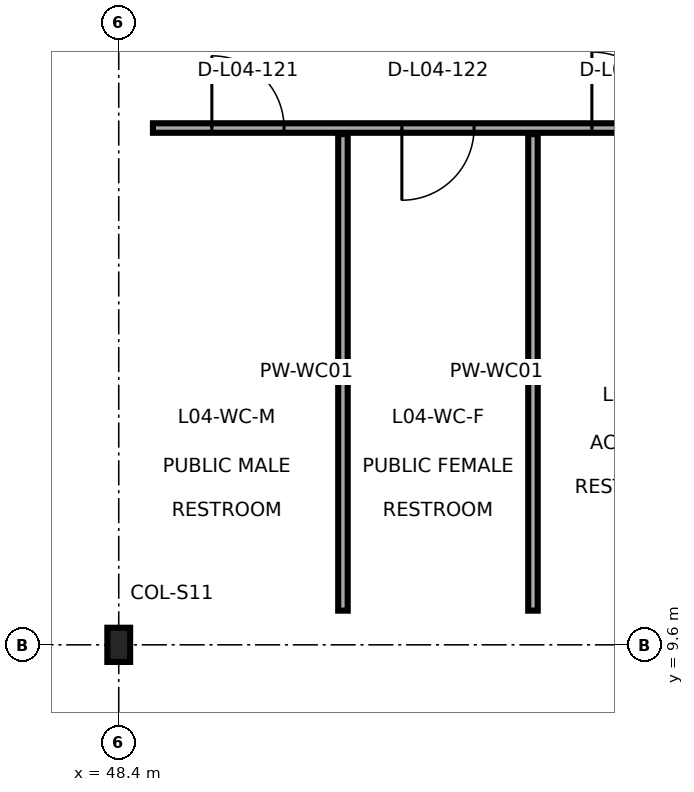
"""IFC4 building model, lengths in metres.
Left out: names, types, materials, properties, quantities, classifications, styles, units other than length and angle.
Written with IfcOpenShell. Run it as: python <this file> out.ifc"""

import sys

from ifc_helpers import new_model, si_unit, direction, frame, frame_2d, origin, origin_2d, place, context, subcontext, project, spatial, rectangle, i_section, extrude, element, fill, save


model = new_model("IFC4")
c1 = context("Model", 3, precision=1e-05, world=origin(), true_north=direction((0.0, 1.0)))
c2 = subcontext(c1, "Body", "Model", "MODEL_VIEW")
j1 = project(units=[si_unit("LENGTHUNIT", "METRE"), si_unit("PLANEANGLEUNIT", "RADIAN")], contexts=[c1])
p1 = place(None, origin())
s1 = spatial("IfcSite", under=j1, at=p1, CompositionType="ELEMENT")
p2 = place(p1, origin())
s2 = spatial("IfcBuilding", under=s1, at=p2, CompositionType="ELEMENT")
p3 = place(p2, frame((0.0, 0.0, 21.9)))
s3 = spatial("IfcBuildingStorey", under=s2, at=p3, CompositionType="ELEMENT", Elevation=21.9)
p4 = place(p3, frame((48.4, 9.6, 0.0), z_axis=(0.0, 0.0, 1.0), x_axis=(1.0, 0.0, 0.0)))
e1 = element("IfcColumn", 1, at=p4, inside=s3, PredefinedType="COLUMN", context=c2, shape_type="SweptSolid", body=[
    extrude(i_section(OverallWidth=0.3, OverallDepth=0.45, WebThickness=0.014, FlangeThickness=0.026, FilletRadius=0.027, at=origin_2d()), origin(), (0.0, 0.0, 1.0), 4.5),
])
p5 = place(p3, frame((48.85, 16.4, 0.0), z_axis=(0.0, 0.0, 1.0), x_axis=(1.0, 0.0, 0.0)))
e2 = element("IfcWall", 2, at=p5, inside=s3, PredefinedType="PARTITIONING", context=c2, shape_type="SweptSolid", body=[
    extrude(rectangle(XDim=7.5, YDim=0.125, at=frame_2d((3.75, 0.0))), origin(), (0.0, 0.0, 1.0), 3.902),
])
p6 = place(p5, frame((0.775, 0.0, 0.0)))
e3 = element("IfcOpeningElement", 3, at=p6, cuts=e2, PredefinedType="OPENING", context=c2, shape_type="SweptSolid", body=[
    extrude(rectangle(XDim=0.95, YDim=2.1, at=frame_2d((0.475, 1.05))), frame((0.0, 0.073, 0.0), z_axis=(0.0, -1.0, 0.0), x_axis=(1.0, 0.0, 0.0)), (0.0, 0.0, 1.0), 0.145),
])
p7 = place(p5, frame((3.275, 0.0, 0.0)))
e4 = element("IfcOpeningElement", 4, at=p7, cuts=e2, PredefinedType="OPENING", context=c2, shape_type="SweptSolid", body=[
    extrude(rectangle(XDim=0.95, YDim=2.1, at=frame_2d((0.475, 1.05))), frame((0.0, 0.073, 0.0), z_axis=(0.0, -1.0, 0.0), x_axis=(1.0, 0.0, 0.0)), (0.0, 0.0, 1.0), 0.145),
])
p8 = place(p5, frame((5.775, 0.0, 0.0)))
e5 = element("IfcOpeningElement", 5, at=p8, cuts=e2, PredefinedType="OPENING", context=c2, shape_type="SweptSolid", body=[
    extrude(rectangle(XDim=1.0, YDim=2.12, at=frame_2d((0.5, 1.06))), frame((0.0, 0.073, 0.0), z_axis=(0.0, -1.0, 0.0), x_axis=(1.0, 0.0, 0.0)), (0.0, 0.0, 1.0), 0.145),
])
for number, where, z_axis, x_axis in (
    (6, (51.35, 10.05, 0.0), (0.0, 0.0, 1.0), (0.0, 1.0, 0.0)),
    (7, (53.85, 10.05, 0.0), (0.0, 0.0, 1.0), (0.0, 1.0, 0.0)),
):
    element("IfcWall", number, at=place(p3, frame(where, z_axis=z_axis, x_axis=x_axis)), inside=s3, PredefinedType="PARTITIONING", context=c2, shape_type="SweptSolid", body=[
        extrude(rectangle(XDim=6.27, YDim=0.125, at=frame_2d((3.135, 0.0))), origin(), (0.0, 0.0, 1.0), 4.23),
    ])
p9 = place(p6, frame((0.95, 0.0, 0.0), z_axis=(0.0, 0.0, 1.0), x_axis=(-1.0, 0.0, 0.0)))
e8 = element("IfcDoor", 8, at=p9, inside=s3, OperationType="SINGLE_SWING_LEFT", PredefinedType="DOOR", context=c2, shape_type="SweptSolid", body=[
    extrude(rectangle(XDim=0.95, YDim=2.1, at=frame_2d((0.475, 1.05))), frame((0.0, 0.025, 0.0), z_axis=(0.0, -1.0, 0.0), x_axis=(1.0, 0.0, 0.0)), (0.0, 0.0, 1.0), 0.05),
])
fill(e3, e8)
p10 = place(p7, frame((0.95, 0.0, 0.0), z_axis=(0.0, 0.0, 1.0), x_axis=(-1.0, 0.0, 0.0)))
e9 = element("IfcDoor", 9, at=p10, inside=s3, OperationType="SINGLE_SWING_RIGHT", PredefinedType="DOOR", context=c2, shape_type="SweptSolid", body=[
    extrude(rectangle(XDim=0.95, YDim=2.1, at=frame_2d((0.475, 1.05))), frame((0.0, 0.025, 0.0), z_axis=(0.0, -1.0, 0.0), x_axis=(1.0, 0.0, 0.0)), (0.0, 0.0, 1.0), 0.05),
])
fill(e4, e9)
p11 = place(p8, frame((1.0, 0.0, 0.0), z_axis=(0.0, 0.0, 1.0), x_axis=(-1.0, 0.0, 0.0)))
e10 = element("IfcDoor", 10, at=p11, inside=s3, OperationType="SINGLE_SWING_LEFT", PredefinedType="DOOR", context=c2, shape_type="SweptSolid", body=[
    extrude(rectangle(XDim=1.0, YDim=2.12, at=frame_2d((0.5, 1.06))), frame((0.0, 0.025, 0.0), z_axis=(0.0, -1.0, 0.0), x_axis=(1.0, 0.0, 0.0)), (0.0, 0.0, 1.0), 0.05),
])
fill(e5, e10)
save(model, sys.argv[1])
